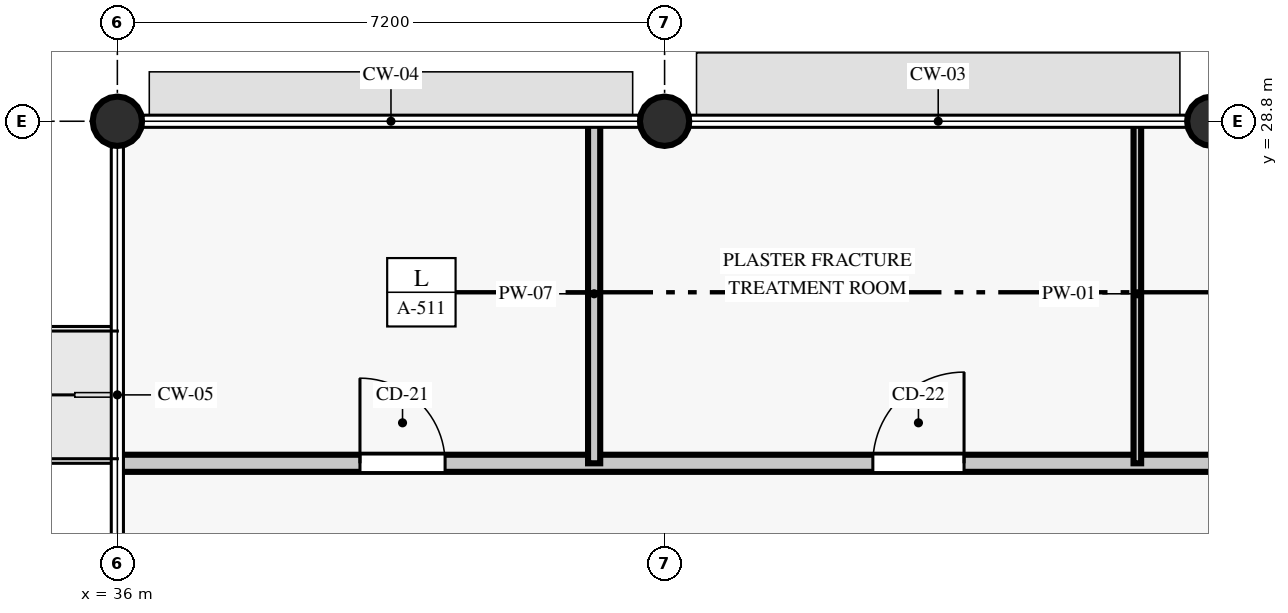
"""IFC4 building model, lengths in metres.
Left out: names, types, materials, properties, quantities, classifications, styles, units other than length and angle.
Written with IfcOpenShell. Run it as: python <this file> out.ifc"""

import sys

from ifc_helpers import new_model, si_unit, direction, frame, frame_2d, origin, origin_2d, place, context, subcontext, project, spatial, rectangle, circle, extrude, element, fill, save


model = new_model("IFC4")
c1 = context("Model", 3, precision=1e-05, world=origin(), true_north=direction((0.0, 1.0)))
c2 = subcontext(c1, "Body", "Model", "MODEL_VIEW")
j1 = project(units=[si_unit("LENGTHUNIT", "METRE"), si_unit("PLANEANGLEUNIT", "RADIAN")], contexts=[c1])
p1 = place(None, origin())
s1 = spatial("IfcSite", under=j1, at=p1, CompositionType="ELEMENT")
p2 = place(p1, origin())
s2 = spatial("IfcBuilding", under=s1, at=p2, CompositionType="ELEMENT")
p3 = place(p2, origin())
s3 = spatial("IfcBuildingStorey", under=s2, at=p3, CompositionType="ELEMENT", Elevation=0.0)
for number, where, z_axis, x_axis in (
    (1, (36.0, 28.8, 0.0), (0.0, 0.0, 1.0), (1.0, 0.0, 0.0)),
    (2, (43.2, 28.8, 0.0), (0.0, 0.0, 1.0), (1.0, 0.0, 0.0)),
    (3, (50.4, 28.8, 0.0), (0.0, 0.0, 1.0), (1.0, 0.0, 0.0)),
):
    element("IfcColumn", number, at=place(p3, frame(where, z_axis=z_axis, x_axis=x_axis)), inside=s3, PredefinedType="COLUMN", context=c2, shape_type="SweptSolid", body=[
        extrude(circle(Radius=0.325, at=origin_2d()), origin(), (0.0, 0.0, 1.0), 4.51),
    ])
p4 = place(p3, frame((36.04, 24.3, 0.0), z_axis=(0.0, 0.0, 1.0), x_axis=(1.0, 0.0, 0.0)))
e4 = element("IfcWall", 4, at=p4, inside=s3, PredefinedType="PARTITIONING", context=c2, shape_type="SweptSolid", body=[
    extrude(rectangle(XDim=21.54, YDim=0.225, at=frame_2d((10.77, 0.0))), origin(), (0.0, 0.0, 1.0), 3.86),
])
p5 = place(p4, frame((3.152, 0.0, 0.0)))
e5 = element("IfcOpeningElement", 5, at=p5, cuts=e4, PredefinedType="OPENING", context=c2, shape_type="SweptSolid", body=[
    extrude(rectangle(XDim=1.12, YDim=2.23, at=frame_2d((0.56, 1.115))), frame((0.0, 0.123, 0.0), z_axis=(0.0, -1.0, 0.0), x_axis=(1.0, 0.0, 0.0)), (0.0, 0.0, 1.0), 0.245),
])
p6 = place(p4, frame((9.9, 0.0, 0.0)))
e6 = element("IfcOpeningElement", 6, at=p6, cuts=e4, PredefinedType="OPENING", context=c2, shape_type="SweptSolid", body=[
    extrude(rectangle(XDim=1.2, YDim=2.23, at=frame_2d((0.6, 1.115))), frame((0.0, 0.123, 0.0), z_axis=(0.0, -1.0, 0.0), x_axis=(1.0, 0.0, 0.0)), (0.0, 0.0, 1.0), 0.245),
])
p7 = place(p4, frame((17.83, 0.0, 0.0)))
e7 = element("IfcOpeningElement", 7, at=p7, cuts=e4, PredefinedType="OPENING", context=c2, shape_type="SweptSolid", body=[
    extrude(rectangle(XDim=0.9, YDim=2.08, at=frame_2d((0.45, 1.04))), frame((0.0, 0.123, 0.0), z_axis=(0.0, -1.0, 0.0), x_axis=(1.0, 0.0, 0.0)), (0.0, 0.0, 1.0), 0.245),
])
p8 = place(p3, frame((42.273, 24.3, 0.0), z_axis=(0.0, 0.0, 1.0), x_axis=(0.0, 1.0, 0.0)))
e8 = element("IfcWall", 8, at=p8, inside=s3, PredefinedType="PARTITIONING", context=c2, shape_type="SweptSolid", body=[
    extrude(rectangle(XDim=4.46, YDim=0.16, at=frame_2d((2.23, 0.0))), origin(), (0.0, 0.0, 1.0), 3.86),
])
p9 = place(p3, frame((49.42, 24.3, 0.0), z_axis=(0.0, 0.0, 1.0), x_axis=(0.0, 1.0, 0.0)))
e9 = element("IfcWall", 9, at=p9, inside=s3, PredefinedType="PARTITIONING", context=c2, shape_type="SweptSolid", body=[
    extrude(rectangle(XDim=4.46, YDim=0.1, at=frame_2d((2.23, 0.0))), origin(), (0.0, 0.0, 1.0), 4.01),
])
p10 = place(p5, origin())
e10 = element("IfcDoor", 10, at=p10, inside=s3, OperationType="SINGLE_SWING_LEFT", PredefinedType="DOOR", context=c2, shape_type="SweptSolid", body=[
    extrude(rectangle(XDim=1.12, YDim=2.23, at=frame_2d((0.56, 1.115))), frame((0.0, 0.025, 0.0), z_axis=(0.0, -1.0, 0.0), x_axis=(1.0, 0.0, 0.0)), (0.0, 0.0, 1.0), 0.05),
])
fill(e5, e10)
p11 = place(p6, origin())
e11 = element("IfcDoor", 11, at=p11, inside=s3, OperationType="SINGLE_SWING_RIGHT", PredefinedType="DOOR", context=c2, shape_type="SweptSolid", body=[
    extrude(rectangle(XDim=1.2, YDim=2.23, at=frame_2d((0.6, 1.115))), frame((0.0, 0.025, 0.0), z_axis=(0.0, -1.0, 0.0), x_axis=(1.0, 0.0, 0.0)), (0.0, 0.0, 1.0), 0.05),
])
fill(e6, e11)
save(model, sys.argv[1])
